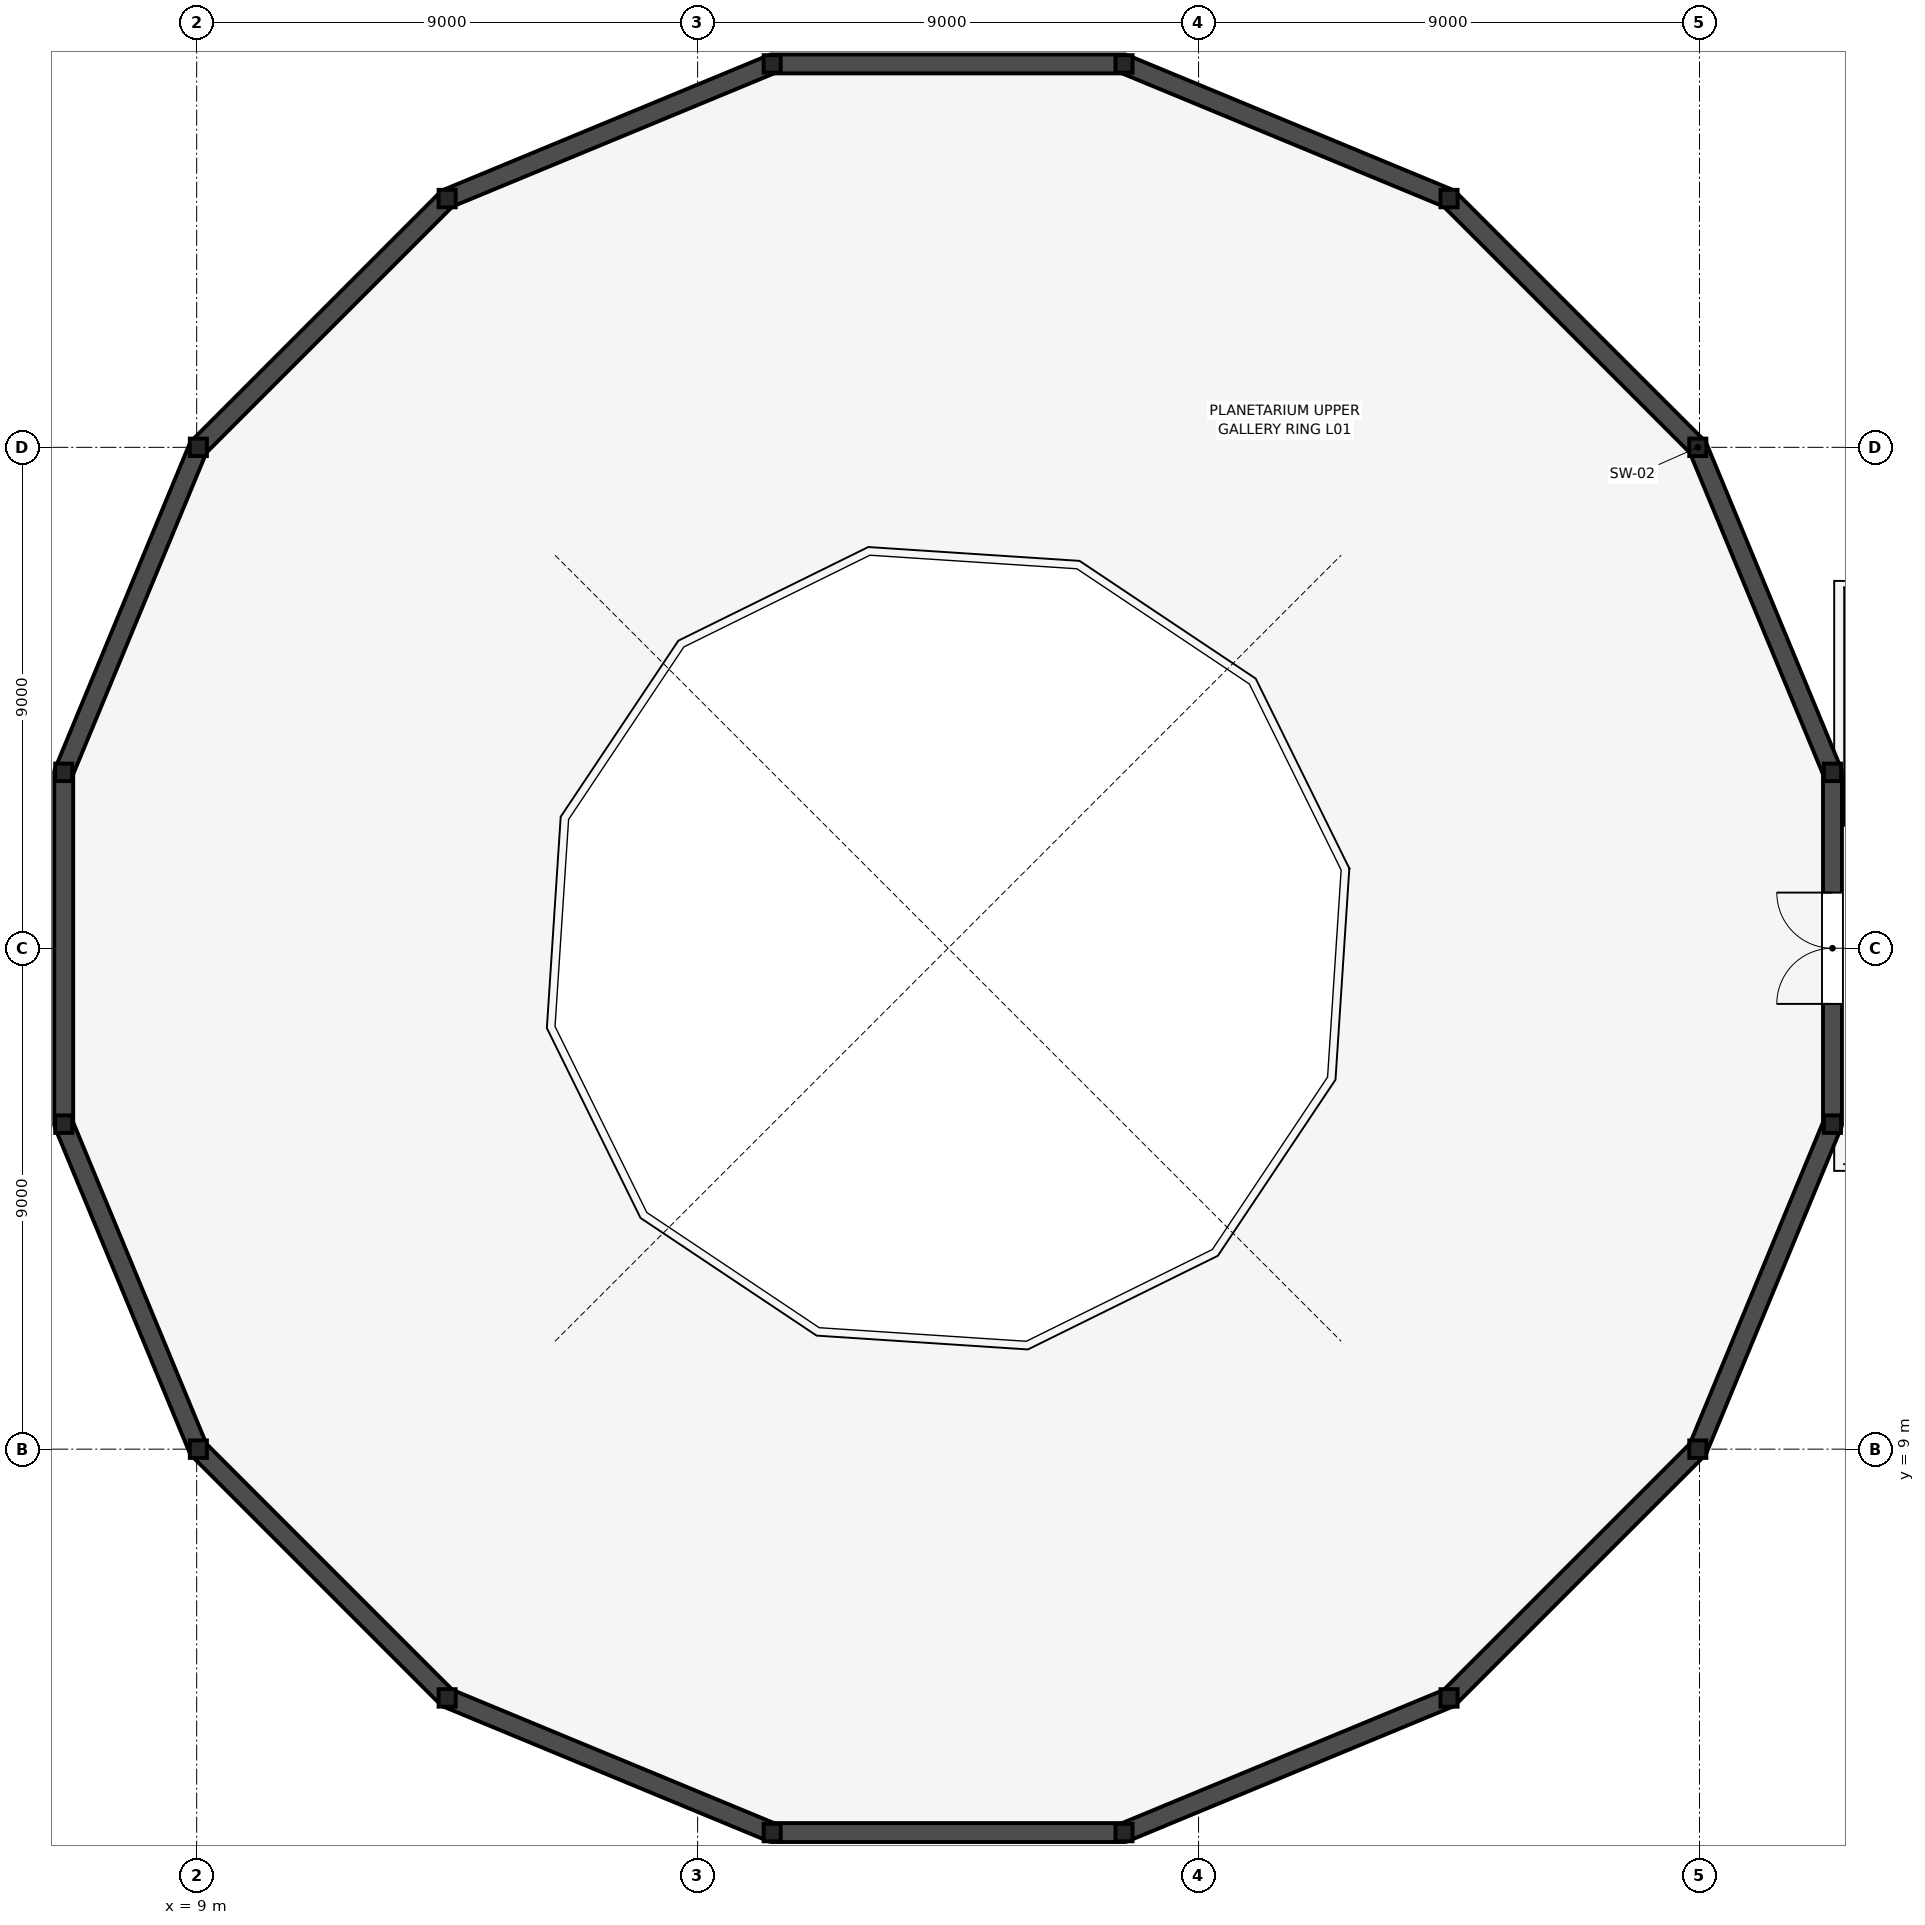
"""IFC4 building model, lengths in metres.
Left out: names, types, materials, properties, quantities, classifications, styles, units other than length and angle.
Written with IfcOpenShell. Run it as: python <this file> out.ifc"""

import sys

from ifc_helpers import new_model, si_unit, direction, frame, frame_2d, origin, origin_2d, place, context, subcontext, project, spatial, rectangle, i_section, extrude, element, fill, save


model = new_model("IFC4")
c1 = context("Model", 3, precision=1e-05, world=origin(), true_north=direction((0.0, 1.0)))
c2 = subcontext(c1, "Body", "Model", "MODEL_VIEW")
j1 = project(units=[si_unit("LENGTHUNIT", "METRE"), si_unit("PLANEANGLEUNIT", "RADIAN")], contexts=[c1])
p1 = place(None, origin())
s1 = spatial("IfcSite", under=j1, at=p1, CompositionType="ELEMENT")
p2 = place(p1, origin())
s2 = spatial("IfcBuilding", under=s1, at=p2, CompositionType="ELEMENT")
p3 = place(p2, frame((0.0, 0.0, 5.4)))
s3 = spatial("IfcBuildingStorey", under=s2, at=p3, CompositionType="ELEMENT", Elevation=5.4)
for number, where, z_axis, x_axis in (
    (1, (38.389, 21.16, 0.0), (0.0, 0.0, 1.0), (1.0, 0.0, 0.0)),
    (2, (35.97, 27.0, 0.0), (0.0, 0.0, 1.0), (1.0, 0.0, 0.0)),
    (3, (31.5, 31.47, 0.0), (0.0, 0.0, 1.0), (1.0, 0.0, 0.0)),
    (4, (25.66, 33.889, 0.0), (0.0, 0.0, 1.0), (1.0, 0.0, 0.0)),
    (5, (19.34, 33.889, 0.0), (0.0, 0.0, 1.0), (1.0, 0.0, 0.0)),
    (6, (13.5, 31.47, 0.0), (0.0, 0.0, 1.0), (1.0, 0.0, 0.0)),
    (7, (9.03, 27.0, 0.0), (0.0, 0.0, 1.0), (1.0, 0.0, 0.0)),
    (8, (6.611, 21.16, 0.0), (0.0, 0.0, 1.0), (1.0, 0.0, 0.0)),
    (9, (6.611, 14.84, 0.0), (0.0, 0.0, 1.0), (1.0, 0.0, 0.0)),
    (10, (9.03, 9.0, 0.0), (0.0, 0.0, 1.0), (1.0, 0.0, 0.0)),
    (11, (13.5, 4.53, 0.0), (0.0, 0.0, 1.0), (1.0, 0.0, 0.0)),
    (12, (19.34, 2.111, 0.0), (0.0, 0.0, 1.0), (1.0, 0.0, 0.0)),
    (13, (25.66, 2.111, 0.0), (0.0, 0.0, 1.0), (1.0, 0.0, 0.0)),
    (14, (31.5, 4.53, 0.0), (0.0, 0.0, 1.0), (1.0, 0.0, 0.0)),
    (15, (35.97, 9.0, 0.0), (0.0, 0.0, 1.0), (1.0, 0.0, 0.0)),
    (16, (38.389, 14.84, 0.0), (0.0, 0.0, 1.0), (1.0, 0.0, 0.0)),
):
    element("IfcColumn", number, at=place(p3, frame(where, z_axis=z_axis, x_axis=x_axis)), inside=s3, PredefinedType="PILASTER", context=c2, shape_type="SweptSolid", body=[
        extrude(i_section(OverallWidth=0.307, OverallDepth=0.315, WebThickness=0.012, FlangeThickness=0.019, FilletRadius=0.017, at=origin_2d()), origin(), (0.0, 0.0, 1.0), 4.5),
    ])
p4 = place(p3, frame((38.389, 21.16, 0.0), z_axis=(0.0, 0.0, 1.0), x_axis=(-0.382683814393, 0.92387937427, 0.0)))
e17 = element("IfcWall", 17, at=p4, inside=s3, PredefinedType="SHEAR", context=c2, shape_type="SweptSolid", body=[
    extrude(rectangle(XDim=6.321, YDim=0.34, at=frame_2d((3.161, 0.0))), origin(), (0.0, 0.0, 1.0), 4.32),
])
p5 = place(p3, frame((35.97, 27.0, 0.0), z_axis=(0.0, 0.0, 1.0), x_axis=(-0.707106781187, 0.707106781187, 0.0)))
e18 = element("IfcWall", 18, at=p5, inside=s3, PredefinedType="SHEAR", context=c2, shape_type="SweptSolid", body=[
    extrude(rectangle(XDim=6.321, YDim=0.34, at=frame_2d((3.16, 0.0))), origin(), (0.0, 0.0, 1.0), 4.32),
])
p6 = place(p3, frame((31.5, 31.47, 0.0), z_axis=(0.0, 0.0, 1.0), x_axis=(-0.92387937427, 0.382683814393, 0.0)))
e19 = element("IfcWall", 19, at=p6, inside=s3, PredefinedType="SHEAR", context=c2, shape_type="SweptSolid", body=[
    extrude(rectangle(XDim=6.321, YDim=0.34, at=frame_2d((3.161, 0.0))), origin(), (0.0, 0.0, 1.0), 4.32),
])
p7 = place(p3, frame((25.66, 33.889, 0.0), z_axis=(0.0, 0.0, 1.0), x_axis=(-1.0, 0.0, 0.0)))
e20 = element("IfcWall", 20, at=p7, inside=s3, PredefinedType="SHEAR", context=c2, shape_type="SweptSolid", body=[
    extrude(rectangle(XDim=6.321, YDim=0.34, at=frame_2d((3.16, 0.0))), origin(), (0.0, 0.0, 1.0), 4.32),
])
p8 = place(p3, frame((19.34, 33.889, 0.0), z_axis=(0.0, 0.0, 1.0), x_axis=(-0.92387937427, -0.382683814393, 0.0)))
e21 = element("IfcWall", 21, at=p8, inside=s3, PredefinedType="SHEAR", context=c2, shape_type="SweptSolid", body=[
    extrude(rectangle(XDim=6.321, YDim=0.34, at=frame_2d((3.161, 0.0))), origin(), (0.0, 0.0, 1.0), 4.32),
])
p9 = place(p3, frame((13.5, 31.47, 0.0), z_axis=(0.0, 0.0, 1.0), x_axis=(-0.707106781187, -0.707106781187, 0.0)))
e22 = element("IfcWall", 22, at=p9, inside=s3, PredefinedType="SHEAR", context=c2, shape_type="SweptSolid", body=[
    extrude(rectangle(XDim=6.321, YDim=0.34, at=frame_2d((3.16, 0.0))), origin(), (0.0, 0.0, 1.0), 4.32),
])
p10 = place(p3, frame((9.03, 27.0, 0.0), z_axis=(0.0, 0.0, 1.0), x_axis=(-0.382683814393, -0.92387937427, 0.0)))
e23 = element("IfcWall", 23, at=p10, inside=s3, PredefinedType="SHEAR", context=c2, shape_type="SweptSolid", body=[
    extrude(rectangle(XDim=6.321, YDim=0.34, at=frame_2d((3.161, 0.0))), origin(), (0.0, 0.0, 1.0), 4.32),
])
p11 = place(p3, frame((6.611, 21.16, 0.0), z_axis=(0.0, 0.0, 1.0), x_axis=(0.0, -1.0, 0.0)))
e24 = element("IfcWall", 24, at=p11, inside=s3, PredefinedType="SHEAR", context=c2, shape_type="SweptSolid", body=[
    extrude(rectangle(XDim=6.321, YDim=0.34, at=frame_2d((3.16, 0.0))), origin(), (0.0, 0.0, 1.0), 4.32),
])
p12 = place(p3, frame((6.611, 14.84, 0.0), z_axis=(0.0, 0.0, 1.0), x_axis=(0.382683814393, -0.92387937427, 0.0)))
e25 = element("IfcWall", 25, at=p12, inside=s3, PredefinedType="SHEAR", context=c2, shape_type="SweptSolid", body=[
    extrude(rectangle(XDim=6.321, YDim=0.34, at=frame_2d((3.161, 0.0))), origin(), (0.0, 0.0, 1.0), 4.32),
])
p13 = place(p3, frame((9.03, 9.0, 0.0), z_axis=(0.0, 0.0, 1.0), x_axis=(0.707106781187, -0.707106781187, 0.0)))
e26 = element("IfcWall", 26, at=p13, inside=s3, PredefinedType="SHEAR", context=c2, shape_type="SweptSolid", body=[
    extrude(rectangle(XDim=6.321, YDim=0.34, at=frame_2d((3.16, 0.0))), origin(), (0.0, 0.0, 1.0), 4.32),
])
p14 = place(p3, frame((13.5, 4.53, 0.0), z_axis=(0.0, 0.0, 1.0), x_axis=(0.92387937427, -0.382683814393, 0.0)))
e27 = element("IfcWall", 27, at=p14, inside=s3, PredefinedType="SHEAR", context=c2, shape_type="SweptSolid", body=[
    extrude(rectangle(XDim=6.321, YDim=0.34, at=frame_2d((3.161, 0.0))), origin(), (0.0, 0.0, 1.0), 4.32),
])
p15 = place(p3, frame((19.34, 2.111, 0.0), z_axis=(0.0, 0.0, 1.0), x_axis=(1.0, 0.0, 0.0)))
e28 = element("IfcWall", 28, at=p15, inside=s3, PredefinedType="SHEAR", context=c2, shape_type="SweptSolid", body=[
    extrude(rectangle(XDim=6.321, YDim=0.34, at=frame_2d((3.16, 0.0))), origin(), (0.0, 0.0, 1.0), 4.32),
])
p16 = place(p3, frame((25.66, 2.111, 0.0), z_axis=(0.0, 0.0, 1.0), x_axis=(0.92387937427, 0.382683814393, 0.0)))
e29 = element("IfcWall", 29, at=p16, inside=s3, PredefinedType="SHEAR", context=c2, shape_type="SweptSolid", body=[
    extrude(rectangle(XDim=6.321, YDim=0.34, at=frame_2d((3.161, 0.0))), origin(), (0.0, 0.0, 1.0), 4.32),
])
p17 = place(p3, frame((31.5, 4.53, 0.0), z_axis=(0.0, 0.0, 1.0), x_axis=(0.707106781187, 0.707106781187, 0.0)))
e30 = element("IfcWall", 30, at=p17, inside=s3, PredefinedType="SHEAR", context=c2, shape_type="SweptSolid", body=[
    extrude(rectangle(XDim=6.321, YDim=0.34, at=frame_2d((3.16, 0.0))), origin(), (0.0, 0.0, 1.0), 4.32),
])
p18 = place(p3, frame((35.97, 9.0, 0.0), z_axis=(0.0, 0.0, 1.0), x_axis=(0.382683814393, 0.92387937427, 0.0)))
e31 = element("IfcWall", 31, at=p18, inside=s3, PredefinedType="SHEAR", context=c2, shape_type="SweptSolid", body=[
    extrude(rectangle(XDim=6.321, YDim=0.34, at=frame_2d((3.161, 0.0))), origin(), (0.0, 0.0, 1.0), 4.32),
])
p19 = place(p3, frame((38.389, 14.84, 0.0), z_axis=(0.0, 0.0, 1.0), x_axis=(0.0, 1.0, 0.0)))
e32 = element("IfcWall", 32, at=p19, inside=s3, PredefinedType="SHEAR", context=c2, shape_type="SweptSolid", body=[
    extrude(rectangle(XDim=6.321, YDim=0.34, at=frame_2d((3.16, 0.0))), origin(), (0.0, 0.0, 1.0), 4.32),
])
p20 = place(p19, frame((2.16, 0.0, 0.0)))
e33 = element("IfcOpeningElement", 33, at=p20, cuts=e32, PredefinedType="OPENING", context=c2, shape_type="SweptSolid", body=[
    extrude(rectangle(XDim=2.0, YDim=2.5, at=frame_2d((1.0, 1.25))), frame((0.0, 0.18, 0.0), z_axis=(0.0, -1.0, 0.0), x_axis=(1.0, 0.0, 0.0)), (0.0, 0.0, 1.0), 0.36),
])
p21 = place(p20, origin())
e34 = element("IfcDoor", 34, at=p21, inside=s3, OperationType="DOUBLE_DOOR_SINGLE_SWING", PredefinedType="DOOR", context=c2, shape_type="SweptSolid", body=[
    extrude(rectangle(XDim=2.0, YDim=2.5, at=frame_2d((1.0, 1.25))), frame((0.0, 0.025, 0.0), z_axis=(0.0, -1.0, 0.0), x_axis=(1.0, 0.0, 0.0)), (0.0, 0.0, 1.0), 0.05),
])
fill(e33, e34)
save(model, sys.argv[1])
